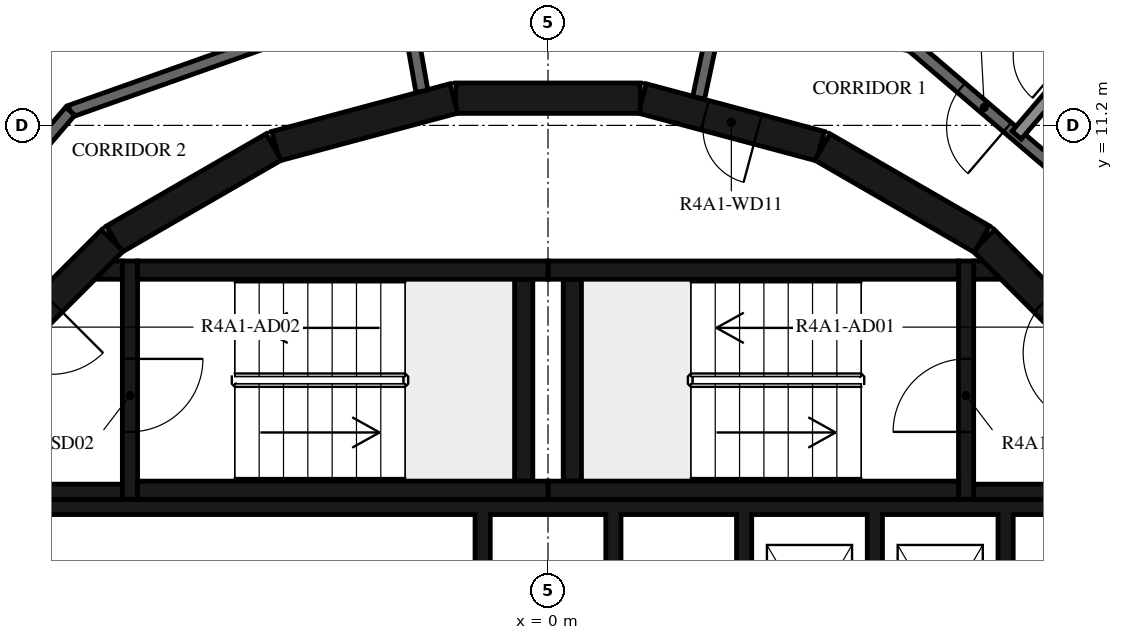
"""IFC4 building model, lengths in metres.
Left out: names, types, materials, properties, quantities, classifications, styles, units other than length and angle.
Written with IfcOpenShell. Run it as: python <this file> out.ifc"""

import sys

from ifc_helpers import new_model, si_unit, direction, frame, frame_2d, origin, place, context, subcontext, project, spatial, polyline, rectangle, outline, extrude, element, fill, save


model = new_model("IFC4")
c1 = context("Model", 3, precision=1e-05, world=origin(), true_north=direction((0.0, 1.0)))
c2 = subcontext(c1, "Body", "Model", "MODEL_VIEW")
j1 = project(units=[si_unit("LENGTHUNIT", "METRE"), si_unit("PLANEANGLEUNIT", "RADIAN")], contexts=[c1])
p1 = place(None, origin())
s1 = spatial("IfcSite", under=j1, at=p1, CompositionType="ELEMENT")
p2 = place(p1, origin())
s2 = spatial("IfcBuilding", under=s1, at=p2, CompositionType="ELEMENT")
p3 = place(p2, frame((0.0, 0.0, 155.2)))
s3 = spatial("IfcBuildingStorey", under=s2, at=p3, CompositionType="ELEMENT", Elevation=155.2)
p4 = place(p3, frame((9.308, 7.164, 0.0), z_axis=(0.0, 0.0, 1.0), x_axis=(-0.707106781187, 0.707106781187, 0.0)))
e1 = element("IfcWall", 1, at=p4, inside=s3, PredefinedType="SHEAR", context=c2, shape_type="SweptSolid", body=[
    extrude(rectangle(XDim=3.032, YDim=0.5, at=frame_2d((1.516, 0.0))), origin(), (0.0, 0.0, 1.0), 3.12),
])
p5 = place(p4, frame((0.416, 0.0, 0.0)))
e2 = element("IfcOpeningElement", 2, at=p5, cuts=e1, PredefinedType="OPENING", context=c2, shape_type="SweptSolid", body=[
    extrude(rectangle(XDim=1.2, YDim=2.1, at=frame_2d((0.6, 1.05))), frame((0.0, 0.26, 0.0), z_axis=(0.0, -1.0, 0.0), x_axis=(1.0, 0.0, 0.0)), (0.0, 0.0, 1.0), 0.52),
])
p6 = place(p3, frame((7.137, 9.329, 0.0), z_axis=(0.0, 0.0, 1.0), x_axis=(-0.865975092491, 0.500087131594, 0.0)))
e3 = element("IfcWall", 3, at=p6, inside=s3, PredefinedType="SHEAR", context=c2, shape_type="SweptSolid", body=[
    extrude(rectangle(XDim=3.033, YDim=0.5, at=frame_2d((1.516, 0.0))), origin(), (0.0, 0.0, 1.0), 3.12),
])
p7 = place(p3, frame((4.479, 10.858, 0.0), z_axis=(0.0, 0.0, 1.0), x_axis=(-0.965948410781, 0.258734743916, 0.0)))
e4 = element("IfcWall", 4, at=p7, inside=s3, PredefinedType="SHEAR", context=c2, shape_type="SweptSolid", body=[
    extrude(rectangle(XDim=3.033, YDim=0.5, at=frame_2d((1.516, 0.0))), origin(), (0.0, 0.0, 1.0), 3.12),
])
p8 = place(p7, frame((1.066, 0.0, 0.0)))
e5 = element("IfcOpeningElement", 5, at=p8, cuts=e4, PredefinedType="OPENING", context=c2, shape_type="SweptSolid", body=[
    extrude(rectangle(XDim=0.9, YDim=2.1, at=frame_2d((0.45, 1.05))), frame((0.0, 0.26, 0.0), z_axis=(0.0, -1.0, 0.0), x_axis=(1.0, 0.0, 0.0)), (0.0, 0.0, 1.0), 0.52),
])
for number, where, z_axis, x_axis in (
    (6, (1.516, 11.647, 0.0), (0.0, 0.0, 1.0), (-1.0, 0.0, 0.0)),
    (7, (-1.55, 11.643, 0.0), (0.0, 0.0, 1.0), (-0.966, -0.259, 0.0)),
    (8, (-4.51, 10.845, 0.0), (0.0, 0.0, 1.0), (-0.866, -0.5, 0.0)),
):
    element("IfcWall", number, at=place(p3, frame(where, z_axis=z_axis, x_axis=x_axis)), inside=s3, PredefinedType="SHEAR", context=c2, shape_type="SweptSolid", body=[
        extrude(rectangle(XDim=3.033, YDim=0.5, at=frame_2d((1.516, 0.0))), origin(), (0.0, 0.0, 1.0), 3.12),
    ])
p9 = place(p3, frame((-7.164, 9.308, 0.0), z_axis=(0.0, 0.0, 1.0), x_axis=(-0.707106781187, -0.707106781187, 0.0)))
e9 = element("IfcWall", 9, at=p9, inside=s3, PredefinedType="SHEAR", context=c2, shape_type="SweptSolid", body=[
    extrude(rectangle(XDim=3.032, YDim=0.5, at=frame_2d((1.516, 0.0))), origin(), (0.0, 0.0, 1.0), 3.12),
])
p10 = place(p9, frame((1.416, 0.0, 0.0)))
e10 = element("IfcOpeningElement", 10, at=p10, cuts=e9, PredefinedType="OPENING", context=c2, shape_type="SweptSolid", body=[
    extrude(rectangle(XDim=1.2, YDim=2.1, at=frame_2d((0.6, 1.05))), frame((0.0, 0.26, 0.0), z_axis=(0.0, -1.0, 0.0), x_axis=(1.0, 0.0, 0.0)), (0.0, 0.0, 1.0), 0.52),
])
for number, where, z_axis, x_axis in (
    (11, (0.0, 5.2, 0.0), (0.0, 0.0, 1.0), (1.0, 0.0, 0.0)),
    (12, (0.0, 8.82, 0.0), (0.0, 0.0, 1.0), (1.0, 0.0, 0.0)),
):
    element("IfcWall", number, at=place(p3, frame(where, z_axis=z_axis, x_axis=x_axis)), inside=s3, PredefinedType="SHEAR", context=c2, shape_type="SweptSolid", body=[
        extrude(rectangle(XDim=6.75, YDim=0.3, at=frame_2d((3.375, 0.0))), origin(), (0.0, 0.0, 1.0), 3.12),
    ])
p11 = place(p3, frame((0.4, 5.35, 0.0), z_axis=(0.0, 0.0, 1.0), x_axis=(0.0, 1.0, 0.0)))
e13 = element("IfcWall", 13, at=p11, inside=s3, PredefinedType="SHEAR", context=c2, shape_type="SweptSolid", body=[
    extrude(rectangle(XDim=3.32, YDim=0.3, at=frame_2d((1.66, 0.0))), origin(), (0.0, 0.0, 1.0), 3.12),
])
p12 = place(p3, frame((6.875, 5.05, 0.0), z_axis=(0.0, 0.0, 1.0), x_axis=(0.0, 1.0, 0.0)))
e14 = element("IfcWall", 14, at=p12, inside=s3, PredefinedType="SHEAR", context=c2, shape_type="SweptSolid", body=[
    extrude(rectangle(XDim=3.92, YDim=0.25, at=frame_2d((1.96, 0.0))), origin(), (0.0, 0.0, 1.0), 3.12),
])
p13 = place(p12, frame((1.11, 0.0, 0.0)))
e15 = element("IfcOpeningElement", 15, at=p13, cuts=e14, PredefinedType="OPENING", context=c2, shape_type="SweptSolid", body=[
    extrude(rectangle(XDim=1.2, YDim=2.1, at=frame_2d((0.6, 1.05))), frame((0.0, 0.135, 0.0), z_axis=(0.0, -1.0, 0.0), x_axis=(1.0, 0.0, 0.0)), (0.0, 0.0, 1.0), 0.27),
])
p14 = place(p3, frame((7.0, 5.175, 0.0), z_axis=(0.0, 0.0, 1.0), x_axis=(1.0, 0.0, 0.0)))
e16 = element("IfcWall", 16, at=p14, inside=s3, PredefinedType="SHEAR", context=c2, shape_type="SweptSolid", body=[
    extrude(rectangle(XDim=3.1, YDim=0.25, at=frame_2d((1.55, 0.0))), origin(), (0.0, 0.0, 1.0), 3.12),
])
p15 = place(p3, origin())
e17 = element("IfcWall", 17, at=p15, inside=s3, PredefinedType="SHEAR", context=c2, shape_type="SweptSolid", body=[
    extrude(outline(polyline([(7.448, 8.67), (7.0, 8.67), (7.0, 8.97), (7.148, 8.97), (7.448, 8.67)])), origin(), (0.0, 0.0, 1.0), 3.12),
])
for number, where, z_axis, x_axis in (
    (18, (-6.75, 5.2, 0.0), (0.0, 0.0, 1.0), (1.0, 0.0, 0.0)),
    (19, (-6.75, 8.82, 0.0), (0.0, 0.0, 1.0), (1.0, 0.0, 0.0)),
):
    element("IfcWall", number, at=place(p3, frame(where, z_axis=z_axis, x_axis=x_axis)), inside=s3, PredefinedType="SHEAR", context=c2, shape_type="SweptSolid", body=[
        extrude(rectangle(XDim=6.75, YDim=0.3, at=frame_2d((3.375, 0.0))), origin(), (0.0, 0.0, 1.0), 3.12),
    ])
p16 = place(p3, frame((-0.4, 5.35, 0.0), z_axis=(0.0, 0.0, 1.0), x_axis=(0.0, 1.0, 0.0)))
e20 = element("IfcWall", 20, at=p16, inside=s3, PredefinedType="SHEAR", context=c2, shape_type="SweptSolid", body=[
    extrude(rectangle(XDim=3.32, YDim=0.3, at=frame_2d((1.66, 0.0))), origin(), (0.0, 0.0, 1.0), 3.12),
])
p17 = place(p3, frame((-6.875, 8.97, 0.0), z_axis=(0.0, 0.0, 1.0), x_axis=(0.0, -1.0, 0.0)))
e21 = element("IfcWall", 21, at=p17, inside=s3, PredefinedType="SHEAR", context=c2, shape_type="SweptSolid", body=[
    extrude(rectangle(XDim=3.92, YDim=0.25, at=frame_2d((1.96, 0.0))), origin(), (0.0, 0.0, 1.0), 3.12),
])
p18 = place(p17, frame((1.61, 0.0, 0.0)))
e22 = element("IfcOpeningElement", 22, at=p18, cuts=e21, PredefinedType="OPENING", context=c2, shape_type="SweptSolid", body=[
    extrude(rectangle(XDim=1.2, YDim=2.1, at=frame_2d((0.6, 1.05))), frame((0.0, 0.135, 0.0), z_axis=(0.0, -1.0, 0.0), x_axis=(1.0, 0.0, 0.0)), (0.0, 0.0, 1.0), 0.27),
])
p19 = place(p3, frame((-7.0, 5.175, 0.0), z_axis=(0.0, 0.0, 1.0), x_axis=(-1.0, 0.0, 0.0)))
e23 = element("IfcWall", 23, at=p19, inside=s3, PredefinedType="SHEAR", context=c2, shape_type="SweptSolid", body=[
    extrude(rectangle(XDim=3.1, YDim=0.25, at=frame_2d((1.55, 0.0))), origin(), (0.0, 0.0, 1.0), 3.12),
])
p20 = place(p3, origin())
e24 = element("IfcWall", 24, at=p20, inside=s3, PredefinedType="SHEAR", context=c2, shape_type="SweptSolid", body=[
    extrude(outline(polyline([(-7.148, 8.97), (-7.0, 8.97), (-7.0, 8.67), (-7.448, 8.67), (-7.148, 8.97)])), origin(), (0.0, 0.0, 1.0), 3.12),
])
p21 = place(p3, origin())
e25 = element("IfcWall", 25, at=p21, inside=s3, PredefinedType="SHEAR", context=c2, shape_type="SweptSolid", body=[
    extrude(outline(polyline([(-9.55, 4.8), (-1.2, 4.8), (-1.2, 1.9), (-0.95, 1.9), (-0.95, 4.8), (0.95, 4.8), (0.95, 1.9), (1.2, 1.9), (1.2, 4.8), (3.1, 4.8), (3.1, 1.9), (3.35, 1.9), (3.35, 4.8), (5.25, 4.8), (5.25, 1.9), (5.5, 1.9), (5.5, 4.8), (7.4, 4.8), (7.4, 1.9), (7.65, 1.9), (7.65, 4.8), (9.55, 4.8), (9.55, 1.9), (9.8, 1.9), (9.8, 4.8), (9.8, 5.05), (-9.8, 5.05), (-9.8, 4.8), (-9.8, 1.9), (-9.55, 1.9), (-9.55, 4.8)])), origin(), (0.0, 0.0, 1.0), 3.12),
])
p22 = place(p3, frame((11.433, 7.858, 0.0), z_axis=(0.0, 0.0, 1.0), x_axis=(-0.760412154545, 0.649440801937, 0.0)))
e26 = element("IfcWall", 26, at=p22, inside=s3, PredefinedType="STANDARD", context=c2, shape_type="SweptSolid", body=[
    extrude(rectangle(XDim=7.181, YDim=0.2, at=frame_2d((3.59, 0.0))), origin(), (0.0, 0.0, 1.0), 3.12),
])
p23 = place(p22, frame((1.7, 0.0, 0.0)))
e27 = element("IfcOpeningElement", 27, at=p23, cuts=e26, PredefinedType="OPENING", context=c2, shape_type="SweptSolid", body=[
    extrude(rectangle(XDim=1.0, YDim=2.1, at=frame_2d((0.5, 1.05))), frame((0.0, 0.11, 0.0), z_axis=(0.0, -1.0, 0.0), x_axis=(1.0, 0.0, 0.0)), (0.0, 0.0, 1.0), 0.22),
])
p24 = place(p22, frame((5.101, 0.0, 0.0)))
e28 = element("IfcOpeningElement", 28, at=p24, cuts=e26, PredefinedType="OPENING", context=c2, shape_type="SweptSolid", body=[
    extrude(rectangle(XDim=1.0, YDim=2.1, at=frame_2d((0.5, 1.05))), frame((0.0, 0.11, 0.0), z_axis=(0.0, -1.0, 0.0), x_axis=(1.0, 0.0, 0.0)), (0.0, 0.0, 1.0), 0.22),
])
p25 = place(p3, frame((2.787, 13.112, 0.0), z_axis=(0.0, 0.0, 1.0), x_axis=(-0.207941001029, -0.978141370197, 0.0)))
e29 = element("IfcWall", 29, at=p25, inside=s3, PredefinedType="STANDARD", context=c2, shape_type="SweptSolid", body=[
    extrude(rectangle(XDim=1.491, YDim=0.2, at=frame_2d((0.746, 0.0))), origin(), (0.0, 0.0, 1.0), 3.12),
])
p26 = place(p3, frame((-2.074, 11.761, 0.0), z_axis=(0.0, 0.0, 1.0), x_axis=(-0.1736412798, 0.984808969267, 0.0)))
e30 = element("IfcWall", 30, at=p26, inside=s3, PredefinedType="STANDARD", context=c2, shape_type="SweptSolid", body=[
    extrude(rectangle(XDim=1.644, YDim=0.2, at=frame_2d((0.822, 0.0))), origin(), (0.0, 0.0, 1.0), 3.12),
])
p27 = place(p3, frame((-2.359, 13.38, 0.0), z_axis=(0.0, 0.0, 1.0), x_axis=(-0.942647529236, -0.333789807551, 0.0)))
e31 = element("IfcWall", 31, at=p27, inside=s3, PredefinedType="STANDARD", context=c2, shape_type="SweptSolid", body=[
    extrude(rectangle(XDim=5.833, YDim=0.2, at=frame_2d((2.917, 0.0))), origin(), (0.0, 0.0, 1.0), 3.12),
])
p28 = place(p3, frame((-7.858, 11.433, 0.0), z_axis=(0.0, 0.0, 1.0), x_axis=(-0.649440801937, -0.760412154545, 0.0)))
e32 = element("IfcWall", 32, at=p28, inside=s3, PredefinedType="STANDARD", context=c2, shape_type="SweptSolid", body=[
    extrude(rectangle(XDim=7.181, YDim=0.2, at=frame_2d((3.59, 0.0))), origin(), (0.0, 0.0, 1.0), 3.12),
])
p29 = place(p28, frame((2.6, 0.0, 0.0)))
e33 = element("IfcOpeningElement", 33, at=p29, cuts=e32, PredefinedType="OPENING", context=c2, shape_type="SweptSolid", body=[
    extrude(rectangle(XDim=1.0, YDim=2.1, at=frame_2d((0.5, 1.05))), frame((0.0, 0.11, 0.0), z_axis=(0.0, -1.0, 0.0), x_axis=(1.0, 0.0, 0.0)), (0.0, 0.0, 1.0), 0.22),
])
p30 = place(p3, frame((11.04, 14.943, 0.0), z_axis=(0.0, 0.0, 1.0), x_axis=(-0.649442880087, -0.760410379666, 0.0)))
e34 = element("IfcWall", 34, at=p30, inside=s3, PredefinedType="STANDARD", context=c2, shape_type="SweptSolid", body=[
    extrude(rectangle(XDim=5.133, YDim=0.2, at=frame_2d((2.566, 0.0))), origin(), (0.0, 0.0, 1.0), 2.73),
])
p31 = place(p3, frame((8.702, 12.206, 0.0), z_axis=(0.0, 0.0, 1.0), x_axis=(-0.760401313718, 0.649453494945, 0.0)))
e35 = element("IfcWall", 35, at=p31, inside=s3, PredefinedType="PARTITIONING", context=c2, shape_type="SweptSolid", body=[
    extrude(rectangle(XDim=16.724, YDim=0.12, at=frame_2d((8.362, 0.0))), origin(), (0.0, 0.0, 1.0), 3.12),
])
p32 = place(p31, frame((0.2, 0.0, 0.0)))
e36 = element("IfcOpeningElement", 36, at=p32, cuts=e35, PredefinedType="OPENING", context=c2, shape_type="SweptSolid", body=[
    extrude(rectangle(XDim=0.9, YDim=2.1, at=frame_2d((0.45, 1.05))), frame((0.0, 0.07, 0.0), z_axis=(0.0, -1.0, 0.0), x_axis=(1.0, 0.0, 0.0)), (0.0, 0.0, 1.0), 0.14),
])
p33 = place(p31, frame((7.099, 0.0, 0.0)))
e37 = element("IfcOpeningElement", 37, at=p33, cuts=e35, PredefinedType="OPENING", context=c2, shape_type="SweptSolid", body=[
    extrude(rectangle(XDim=0.9, YDim=2.1, at=frame_2d((0.45, 1.05))), frame((0.0, 0.07, 0.0), z_axis=(0.0, -1.0, 0.0), x_axis=(1.0, 0.0, 0.0)), (0.0, 0.0, 1.0), 0.14),
])
p34 = place(p13, origin())
e38 = element("IfcDoor", 38, at=p34, inside=s3, OperationType="SINGLE_SWING_LEFT", PredefinedType="DOOR", context=c2, shape_type="SweptSolid", body=[
    extrude(rectangle(XDim=1.2, YDim=2.1, at=frame_2d((0.6, 1.05))), frame((0.0, 0.025, 0.0), z_axis=(0.0, -1.0, 0.0), x_axis=(1.0, 0.0, 0.0)), (0.0, 0.0, 1.0), 0.05),
])
fill(e15, e38)
p35 = place(p5, origin())
e39 = element("IfcDoor", 39, at=p35, inside=s3, OperationType="SINGLE_SWING_RIGHT", PredefinedType="DOOR", context=c2, shape_type="SweptSolid", body=[
    extrude(rectangle(XDim=1.2, YDim=2.1, at=frame_2d((0.6, 1.05))), frame((0.0, 0.025, 0.0), z_axis=(0.0, -1.0, 0.0), x_axis=(1.0, 0.0, 0.0)), (0.0, 0.0, 1.0), 0.05),
])
fill(e2, e39)
p36 = place(p18, origin())
e40 = element("IfcDoor", 40, at=p36, inside=s3, OperationType="SINGLE_SWING_LEFT", PredefinedType="DOOR", context=c2, shape_type="SweptSolid", body=[
    extrude(rectangle(XDim=1.2, YDim=2.1, at=frame_2d((0.6, 1.05))), frame((0.0, 0.025, 0.0), z_axis=(0.0, -1.0, 0.0), x_axis=(1.0, 0.0, 0.0)), (0.0, 0.0, 1.0), 0.05),
])
fill(e22, e40)
p37 = place(p10, origin())
e41 = element("IfcDoor", 41, at=p37, inside=s3, OperationType="SINGLE_SWING_RIGHT", PredefinedType="DOOR", context=c2, shape_type="SweptSolid", body=[
    extrude(rectangle(XDim=1.2, YDim=2.1, at=frame_2d((0.6, 1.05))), frame((0.0, 0.025, 0.0), z_axis=(0.0, -1.0, 0.0), x_axis=(1.0, 0.0, 0.0)), (0.0, 0.0, 1.0), 0.05),
])
fill(e10, e41)
p38 = place(p8, origin())
e42 = element("IfcDoor", 42, at=p38, inside=s3, OperationType="SINGLE_SWING_LEFT", PredefinedType="DOOR", context=c2, shape_type="SweptSolid", body=[
    extrude(rectangle(XDim=0.9, YDim=2.1, at=frame_2d((0.45, 1.05))), frame((0.0, 0.025, 0.0), z_axis=(0.0, -1.0, 0.0), x_axis=(1.0, 0.0, 0.0)), (0.0, 0.0, 1.0), 0.05),
])
fill(e5, e42)
p39 = place(p24, origin())
e43 = element("IfcDoor", 43, at=p39, inside=s3, OperationType="SINGLE_SWING_RIGHT", PredefinedType="DOOR", context=c2, shape_type="SweptSolid", body=[
    extrude(rectangle(XDim=1.0, YDim=2.1, at=frame_2d((0.5, 1.05))), frame((0.0, 0.025, 0.0), z_axis=(0.0, -1.0, 0.0), x_axis=(1.0, 0.0, 0.0)), (0.0, 0.0, 1.0), 0.05),
])
fill(e28, e43)
p40 = place(p32, origin())
e44 = element("IfcDoor", 44, at=p40, inside=s3, OperationType="SINGLE_SWING_RIGHT", PredefinedType="DOOR", context=c2, shape_type="SweptSolid", body=[
    extrude(rectangle(XDim=0.9, YDim=2.1, at=frame_2d((0.45, 1.05))), frame((0.0, 0.025, 0.0), z_axis=(0.0, -1.0, 0.0), x_axis=(1.0, 0.0, 0.0)), (0.0, 0.0, 1.0), 0.05),
])
fill(e36, e44)
save(model, sys.argv[1])
